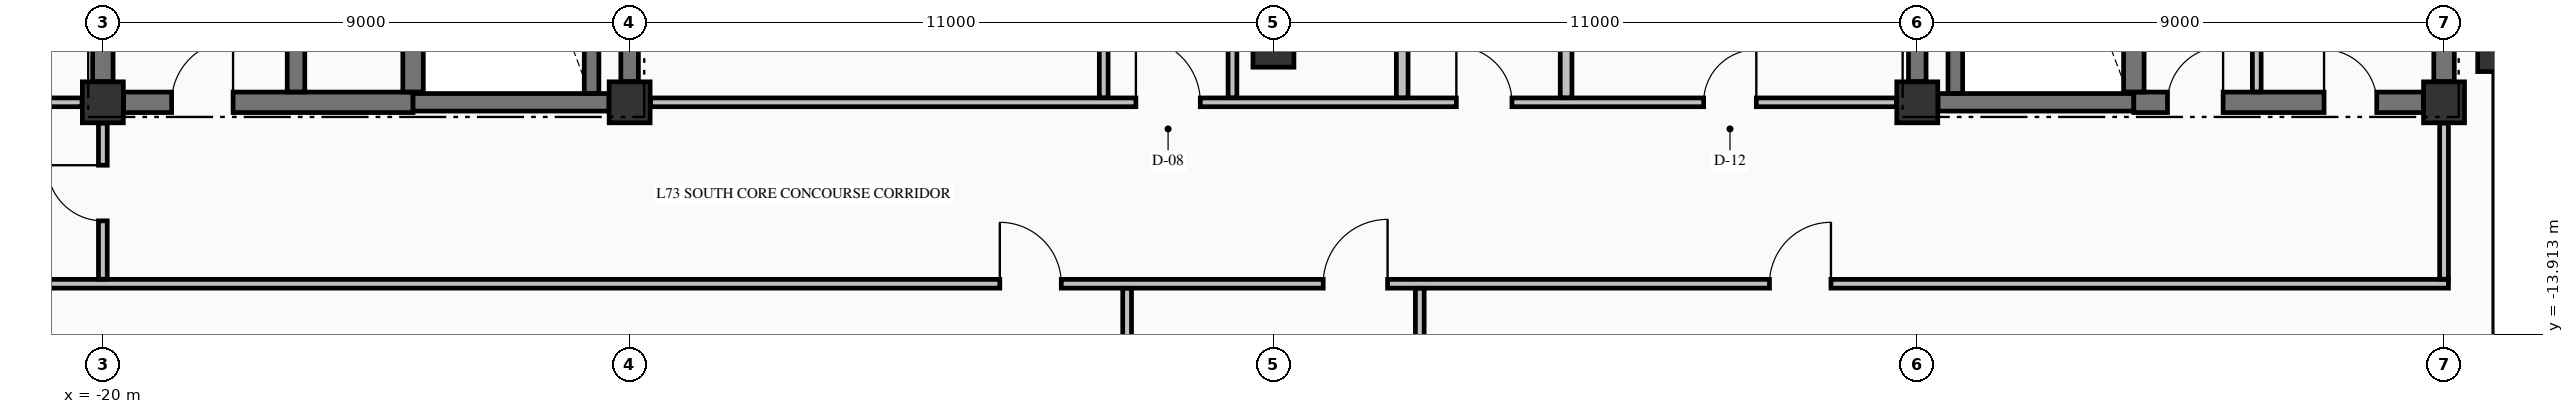
"""IFC4 building model, lengths in metres.
Left out: names, types, materials, properties, quantities, classifications, styles, units other than length and angle.
Written with IfcOpenShell. Run it as: python <this file> out.ifc"""

import sys

from ifc_helpers import new_model, si_unit, direction, frame, frame_2d, origin, origin_2d, place, context, subcontext, project, spatial, rectangle, extrude, element, fill, save


model = new_model("IFC4")
c1 = context("Model", 3, precision=1e-05, world=origin(), true_north=direction((0.0, 1.0)))
c2 = subcontext(c1, "Body", "Model", "MODEL_VIEW")
j1 = project(units=[si_unit("LENGTHUNIT", "METRE"), si_unit("PLANEANGLEUNIT", "RADIAN")], contexts=[c1])
p1 = place(None, origin())
s1 = spatial("IfcSite", under=j1, at=p1, CompositionType="ELEMENT")
p2 = place(p1, origin())
s2 = spatial("IfcBuilding", under=s1, at=p2, CompositionType="ELEMENT")
p3 = place(p2, frame((0.0, 0.0, 274.32)))
s3 = spatial("IfcBuildingStorey", under=s2, at=p3, CompositionType="ELEMENT", Elevation=274.32)
p4 = place(p3, frame((21.0, -9.0, -0.25), z_axis=(0.0, 0.0, 1.0), x_axis=(1.0, 0.0, 0.0)))
e1 = element("IfcColumn", 1, at=p4, inside=s3, PredefinedType="COLUMN", context=c2, shape_type="SweptSolid", body=[
    extrude(rectangle(XDim=0.85, YDim=0.85, at=origin_2d()), origin(), (0.0, 0.0, 1.0), 3.565),
])
for number, where, z_axis, x_axis in (
    (2, (-20.0, -9.95, -0.25), (0.0, 0.0, 1.0), (1.0, 0.0, 0.0)),
    (3, (-11.0, -9.95, -0.25), (0.0, 0.0, 1.0), (1.0, 0.0, 0.0)),
    (4, (11.0, -9.95, -0.25), (0.0, 0.0, 1.0), (1.0, 0.0, 0.0)),
    (5, (20.0, -9.95, -0.25), (0.0, 0.0, 1.0), (1.0, 0.0, 0.0)),
    (6, (0.0, -9.0, -0.25), (0.0, 0.0, 1.0), (1.0, 0.0, 0.0)),
):
    element("IfcColumn", number, at=place(p3, frame(where, z_axis=z_axis, x_axis=x_axis)), inside=s3, PredefinedType="COLUMN", context=c2, shape_type="SweptSolid", body=[
        extrude(rectangle(XDim=0.7, YDim=0.7, at=origin_2d()), origin(), (0.0, 0.0, 1.0), 3.565),
    ])
p5 = place(p3, frame((21.0, -17.545, 0.0), z_axis=(0.0, 0.0, 1.0), x_axis=(0.0, 1.0, 0.0)))
e7 = element("IfcWall", 7, at=p5, inside=s3, PredefinedType="STANDARD", context=c2, shape_type="SweptSolid", body=[
    extrude(rectangle(XDim=8.09, YDim=0.3, at=frame_2d((4.045, 0.0))), origin(), (0.0, 0.0, 1.0), 2.707),
])
p6 = place(p3, frame((-19.646, -9.95, 0.0), z_axis=(0.0, 0.0, 1.0), x_axis=(1.0, 0.0, 0.0)))
e8 = element("IfcWall", 8, at=p6, inside=s3, PredefinedType="SHEAR", context=c2, shape_type="SweptSolid", body=[
    extrude(rectangle(XDim=4.946, YDim=0.35, at=frame_2d((2.473, 0.0))), origin(), (0.0, 0.0, 1.0), 3.315),
])
p7 = place(p6, frame((0.821, 0.0, 0.0)))
e9 = element("IfcOpeningElement", 9, at=p7, cuts=e8, PredefinedType="OPENING", context=c2, shape_type="SweptSolid", body=[
    extrude(rectangle(XDim=1.05, YDim=2.15, at=frame_2d((0.525, 1.075))), frame((0.0, 0.185, 0.0), z_axis=(0.0, -1.0, 0.0), x_axis=(1.0, 0.0, 0.0)), (0.0, 0.0, 1.0), 0.37),
])
for number, where, z_axis, x_axis in (
    (10, (-14.7, -9.95, 0.0), (0.0, 0.0, 1.0), (1.0, 0.0, 0.0)),
    (11, (11.354, -9.95, 0.0), (0.0, 0.0, 1.0), (1.0, 0.0, 0.0)),
):
    element("IfcWall", number, at=place(p3, frame(where, z_axis=z_axis, x_axis=x_axis)), inside=s3, PredefinedType="SHEAR", context=c2, shape_type="SweptSolid", body=[
        extrude(rectangle(XDim=3.346, YDim=0.3, at=frame_2d((1.673, 0.0))), origin(), (0.0, 0.0, 1.0), 3.315),
    ])
p8 = place(p3, frame((14.7, -9.95, 0.0), z_axis=(0.0, 0.0, 1.0), x_axis=(1.0, 0.0, 0.0)))
e12 = element("IfcWall", 12, at=p8, inside=s3, PredefinedType="SHEAR", context=c2, shape_type="SweptSolid", body=[
    extrude(rectangle(XDim=4.946, YDim=0.35, at=frame_2d((2.473, 0.0))), origin(), (0.0, 0.0, 1.0), 3.315),
])
p9 = place(p8, frame((3.25, 0.0, 0.0)))
e13 = element("IfcOpeningElement", 13, at=p9, cuts=e12, PredefinedType="OPENING", context=c2, shape_type="SweptSolid", body=[
    extrude(rectangle(XDim=0.9, YDim=2.15, at=frame_2d((0.45, 1.075))), frame((0.0, 0.185, 0.0), z_axis=(0.0, -1.0, 0.0), x_axis=(1.0, 0.0, 0.0)), (0.0, 0.0, 1.0), 0.37),
])
p10 = place(p8, frame((0.575, 0.0, 0.0)))
e14 = element("IfcOpeningElement", 14, at=p10, cuts=e12, PredefinedType="OPENING", context=c2, shape_type="SweptSolid", body=[
    extrude(rectangle(XDim=0.95, YDim=2.15, at=frame_2d((0.475, 1.075))), frame((0.0, 0.185, 0.0), z_axis=(0.0, -1.0, 0.0), x_axis=(1.0, 0.0, 0.0)), (0.0, 0.0, 1.0), 0.37),
])
p11 = place(p3, frame((-25.835, -13.05, 0.0), z_axis=(0.0, 0.0, 1.0), x_axis=(1.0, 0.0, 0.0)))
e15 = element("IfcWall", 15, at=p11, inside=s3, PredefinedType="PARTITIONING", context=c2, shape_type="SweptSolid", body=[
    extrude(rectangle(XDim=45.91, YDim=0.15, at=frame_2d((22.955, 0.0))), origin(), (0.0, 0.0, 1.0), 3.315),
])
p12 = place(p11, frame((26.685, 0.0, 0.0)))
e16 = element("IfcOpeningElement", 16, at=p12, cuts=e15, PredefinedType="OPENING", context=c2, shape_type="SweptSolid", body=[
    extrude(rectangle(XDim=1.1, YDim=2.15, at=frame_2d((0.55, 1.075))), frame((0.0, 0.085, 0.0), z_axis=(0.0, -1.0, 0.0), x_axis=(1.0, 0.0, 0.0)), (0.0, 0.0, 1.0), 0.17),
])
p13 = place(p11, frame((21.16, 0.0, 0.0)))
e17 = element("IfcOpeningElement", 17, at=p13, cuts=e15, PredefinedType="OPENING", context=c2, shape_type="SweptSolid", body=[
    extrude(rectangle(XDim=1.05, YDim=2.15, at=frame_2d((0.525, 1.075))), frame((0.0, 0.085, 0.0), z_axis=(0.0, -1.0, 0.0), x_axis=(1.0, 0.0, 0.0)), (0.0, 0.0, 1.0), 0.17),
])
p14 = place(p11, frame((34.31, 0.0, 0.0)))
e18 = element("IfcOpeningElement", 18, at=p14, cuts=e15, PredefinedType="OPENING", context=c2, shape_type="SweptSolid", body=[
    extrude(rectangle(XDim=1.05, YDim=2.15, at=frame_2d((0.525, 1.075))), frame((0.0, 0.085, 0.0), z_axis=(0.0, -1.0, 0.0), x_axis=(1.0, 0.0, 0.0)), (0.0, 0.0, 1.0), 0.17),
])
p15 = place(p3, frame((-25.835, -9.95, 0.0), z_axis=(0.0, 0.0, 1.0), x_axis=(1.0, 0.0, 0.0)))
e19 = element("IfcWall", 19, at=p15, inside=s3, PredefinedType="PARTITIONING", context=c2, shape_type="SweptSolid", body=[
    extrude(rectangle(XDim=5.479, YDim=0.15, at=frame_2d((2.74, 0.0))), origin(), (0.0, 0.0, 1.0), 3.315),
])
p16 = place(p15, frame((2.335, 0.0, 0.0)))
e20 = element("IfcOpeningElement", 20, at=p16, cuts=e19, PredefinedType="OPENING", context=c2, shape_type="SweptSolid", body=[
    extrude(rectangle(XDim=1.0, YDim=2.15, at=frame_2d((0.5, 1.075))), frame((0.0, 0.085, 0.0), z_axis=(0.0, -1.0, 0.0), x_axis=(1.0, 0.0, 0.0)), (0.0, 0.0, 1.0), 0.17),
])
p17 = place(p3, frame((-10.644, -9.95, 0.0), z_axis=(0.0, 0.0, 1.0), x_axis=(1.0, 0.0, 0.0)))
e21 = element("IfcWall", 21, at=p17, inside=s3, PredefinedType="PARTITIONING", context=c2, shape_type="SweptSolid", body=[
    extrude(rectangle(XDim=21.288, YDim=0.15, at=frame_2d((10.644, 0.0))), origin(), (0.0, 0.0, 1.0), 3.315),
])
p18 = place(p17, frame((8.294, 0.0, 0.0)))
e22 = element("IfcOpeningElement", 22, at=p18, cuts=e21, PredefinedType="OPENING", context=c2, shape_type="SweptSolid", body=[
    extrude(rectangle(XDim=1.1, YDim=2.15, at=frame_2d((0.55, 1.075))), frame((0.0, 0.085, 0.0), z_axis=(0.0, -1.0, 0.0), x_axis=(1.0, 0.0, 0.0)), (0.0, 0.0, 1.0), 0.17),
])
p19 = place(p17, frame((13.769, 0.0, 0.0)))
e23 = element("IfcOpeningElement", 23, at=p19, cuts=e21, PredefinedType="OPENING", context=c2, shape_type="SweptSolid", body=[
    extrude(rectangle(XDim=0.95, YDim=2.15, at=frame_2d((0.475, 1.075))), frame((0.0, 0.085, 0.0), z_axis=(0.0, -1.0, 0.0), x_axis=(1.0, 0.0, 0.0)), (0.0, 0.0, 1.0), 0.17),
])
p20 = place(p17, frame((17.994, 0.0, 0.0)))
e24 = element("IfcOpeningElement", 24, at=p20, cuts=e21, PredefinedType="OPENING", context=c2, shape_type="SweptSolid", body=[
    extrude(rectangle(XDim=0.9, YDim=2.15, at=frame_2d((0.45, 1.075))), frame((0.0, 0.085, 0.0), z_axis=(0.0, -1.0, 0.0), x_axis=(1.0, 0.0, 0.0)), (0.0, 0.0, 1.0), 0.17),
])
p21 = place(p3, frame((-20.0, -9.596, 0.0), z_axis=(0.0, 0.0, 1.0), x_axis=(0.0, 1.0, 0.0)))
e25 = element("IfcWall", 25, at=p21, inside=s3, PredefinedType="SHEAR", context=c2, shape_type="SweptSolid", body=[
    extrude(rectangle(XDim=9.242, YDim=0.35, at=frame_2d((4.621, 0.0))), origin(), (0.0, 0.0, 1.0), 3.315),
])
p22 = place(p3, frame((-16.7, -9.773, 0.0), z_axis=(0.0, 0.0, 1.0), x_axis=(0.0, 1.0, 0.0)))
e26 = element("IfcWall", 26, at=p22, inside=s3, PredefinedType="SHEAR", context=c2, shape_type="SweptSolid", body=[
    extrude(rectangle(XDim=9.371, YDim=0.3, at=frame_2d((4.686, 0.0))), origin(), (0.0, 0.0, 1.0), 3.315),
])
p23 = place(p3, frame((-14.7, -9.773, 0.0), z_axis=(0.0, 0.0, 1.0), x_axis=(0.0, 1.0, 0.0)))
e27 = element("IfcWall", 27, at=p23, inside=s3, PredefinedType="SHEAR", context=c2, shape_type="SweptSolid", body=[
    extrude(rectangle(XDim=9.371, YDim=0.35, at=frame_2d((4.686, 0.0))), origin(), (0.0, 0.0, 1.0), 3.315),
])
p24 = place(p3, frame((-11.65, -9.798, 0.0), z_axis=(0.0, 0.0, 1.0), x_axis=(0.0, 1.0, 0.0)))
e28 = element("IfcWall", 28, at=p24, inside=s3, PredefinedType="SOLIDWALL", context=c2, shape_type="SweptSolid", body=[
    extrude(rectangle(XDim=9.396, YDim=0.25, at=frame_2d((4.698, 0.0))), origin(), (0.0, 0.0, 1.0), 3.315),
])
for number, where, z_axis, x_axis in (
    (29, (-11.0, -9.596, 0.0), (0.0, 0.0, 1.0), (0.0, 1.0, 0.0)),
    (30, (11.0, -9.596, 0.0), (0.0, 0.0, 1.0), (0.0, 1.0, 0.0)),
):
    element("IfcWall", number, at=place(p3, frame(where, z_axis=z_axis, x_axis=x_axis)), inside=s3, PredefinedType="SHEAR", context=c2, shape_type="SweptSolid", body=[
        extrude(rectangle(XDim=9.242, YDim=0.3, at=frame_2d((4.621, 0.0))), origin(), (0.0, 0.0, 1.0), 3.315),
    ])
p25 = place(p3, frame((11.65, -9.798, 0.0), z_axis=(0.0, 0.0, 1.0), x_axis=(0.0, 1.0, 0.0)))
e31 = element("IfcWall", 31, at=p25, inside=s3, PredefinedType="SOLIDWALL", context=c2, shape_type="SweptSolid", body=[
    extrude(rectangle(XDim=9.396, YDim=0.25, at=frame_2d((4.698, 0.0))), origin(), (0.0, 0.0, 1.0), 3.315),
])
p26 = place(p3, frame((14.7, -9.773, 0.0), z_axis=(0.0, 0.0, 1.0), x_axis=(0.0, 1.0, 0.0)))
e32 = element("IfcWall", 32, at=p26, inside=s3, PredefinedType="SHEAR", context=c2, shape_type="SweptSolid", body=[
    extrude(rectangle(XDim=9.371, YDim=0.35, at=frame_2d((4.686, 0.0))), origin(), (0.0, 0.0, 1.0), 3.315),
])
p27 = place(p3, frame((20.0, -9.596, 0.0), z_axis=(0.0, 0.0, 1.0), x_axis=(0.0, 1.0, 0.0)))
e33 = element("IfcWall", 33, at=p27, inside=s3, PredefinedType="SHEAR", context=c2, shape_type="SweptSolid", body=[
    extrude(rectangle(XDim=14.769, YDim=0.35, at=frame_2d((7.385, 0.0))), origin(), (0.0, 0.0, 1.0), 3.315),
])
p28 = place(p3, frame((-20.0, -12.972, 0.0), z_axis=(0.0, 0.0, 1.0), x_axis=(0.0, 1.0, 0.0)))
e34 = element("IfcWall", 34, at=p28, inside=s3, PredefinedType="PARTITIONING", context=c2, shape_type="SweptSolid", body=[
    extrude(rectangle(XDim=2.666, YDim=0.15, at=frame_2d((1.333, 0.0))), origin(), (0.0, 0.0, 1.0), 3.315),
])
p29 = place(p28, frame((0.997, 0.0, 0.0)))
e35 = element("IfcOpeningElement", 35, at=p29, cuts=e34, PredefinedType="OPENING", context=c2, shape_type="SweptSolid", body=[
    extrude(rectangle(XDim=0.95, YDim=2.15, at=frame_2d((0.475, 1.075))), frame((0.0, 0.085, 0.0), z_axis=(0.0, -1.0, 0.0), x_axis=(1.0, 0.0, 0.0)), (0.0, 0.0, 1.0), 0.17),
])
p30 = place(p3, frame((-2.9, -9.872, 0.0), z_axis=(0.0, 0.0, 1.0), x_axis=(0.0, 1.0, 0.0)))
e36 = element("IfcWall", 36, at=p30, inside=s3, PredefinedType="PARTITIONING", context=c2, shape_type="SweptSolid", body=[
    extrude(rectangle(XDim=9.544, YDim=0.15, at=frame_2d((4.772, 0.0))), origin(), (0.0, 0.0, 1.0), 3.315),
])
p31 = place(p3, frame((-2.5, -18.272, 0.0), z_axis=(0.0, 0.0, 1.0), x_axis=(0.0, 1.0, 0.0)))
e37 = element("IfcWall", 37, at=p31, inside=s3, PredefinedType="PARTITIONING", context=c2, shape_type="SweptSolid", body=[
    extrude(rectangle(XDim=5.144, YDim=0.15, at=frame_2d((2.572, 0.0))), origin(), (0.0, 0.0, 1.0), 3.315),
])
p32 = place(p3, frame((-0.7, -9.872, 0.0), z_axis=(0.0, 0.0, 1.0), x_axis=(0.0, 1.0, 0.0)))
e38 = element("IfcWall", 38, at=p32, inside=s3, PredefinedType="PARTITIONING", context=c2, shape_type="SweptSolid", body=[
    extrude(rectangle(XDim=5.519, YDim=0.15, at=frame_2d((2.76, 0.0))), origin(), (0.0, 0.0, 1.0), 3.315),
])
p33 = place(p32, frame((2.597, 0.0, 0.0)))
e39 = element("IfcOpeningElement", 39, at=p33, cuts=e38, PredefinedType="OPENING", context=c2, shape_type="SweptSolid", body=[
    extrude(rectangle(XDim=0.95, YDim=2.15, at=frame_2d((0.475, 1.075))), frame((0.0, 0.085, 0.0), z_axis=(0.0, -1.0, 0.0), x_axis=(1.0, 0.0, 0.0)), (0.0, 0.0, 1.0), 0.17),
])
p34 = place(p3, frame((2.2, -9.872, 0.0), z_axis=(0.0, 0.0, 1.0), x_axis=(0.0, 1.0, 0.0)))
e40 = element("IfcWall", 40, at=p34, inside=s3, PredefinedType="PARTITIONING", context=c2, shape_type="SweptSolid", body=[
    extrude(rectangle(XDim=5.519, YDim=0.2, at=frame_2d((2.76, 0.0))), origin(), (0.0, 0.0, 1.0), 3.315),
])
p35 = place(p3, frame((2.5, -18.272, 0.0), z_axis=(0.0, 0.0, 1.0), x_axis=(0.0, 1.0, 0.0)))
e41 = element("IfcWall", 41, at=p35, inside=s3, PredefinedType="PARTITIONING", context=c2, shape_type="SweptSolid", body=[
    extrude(rectangle(XDim=5.144, YDim=0.15, at=frame_2d((2.572, 0.0))), origin(), (0.0, 0.0, 1.0), 3.315),
])
p36 = place(p3, frame((5.0, -9.872, 0.0), z_axis=(0.0, 0.0, 1.0), x_axis=(0.0, 1.0, 0.0)))
e42 = element("IfcWall", 42, at=p36, inside=s3, PredefinedType="PARTITIONING", context=c2, shape_type="SweptSolid", body=[
    extrude(rectangle(XDim=5.519, YDim=0.2, at=frame_2d((2.76, 0.0))), origin(), (0.0, 0.0, 1.0), 3.315),
])
p37 = place(p3, frame((16.8, -9.772, 0.0), z_axis=(0.0, 0.0, 1.0), x_axis=(0.0, 1.0, 0.0)))
e43 = element("IfcWall", 43, at=p37, inside=s3, PredefinedType="PARTITIONING", context=c2, shape_type="SweptSolid", body=[
    extrude(rectangle(XDim=7.194, YDim=0.15, at=frame_2d((3.597, 0.0))), origin(), (0.0, 0.0, 1.0), 3.315),
])
p38 = place(p3, frame((20.0, -12.972, 0.0), z_axis=(0.0, 0.0, 1.0), x_axis=(0.0, 1.0, 0.0)))
e44 = element("IfcWall", 44, at=p38, inside=s3, PredefinedType="PARTITIONING", context=c2, shape_type="SweptSolid", body=[
    extrude(rectangle(XDim=2.666, YDim=0.15, at=frame_2d((1.333, 0.0))), origin(), (0.0, 0.0, 1.0), 2.905),
])
p39 = place(p7, origin())
e45 = element("IfcDoor", 45, at=p39, inside=s3, OperationType="SINGLE_SWING_RIGHT", PredefinedType="DOOR", context=c2, shape_type="SweptSolid", body=[
    extrude(rectangle(XDim=1.05, YDim=2.15, at=frame_2d((0.525, 1.075))), frame((0.0, 0.025, 0.0), z_axis=(0.0, -1.0, 0.0), x_axis=(1.0, 0.0, 0.0)), (0.0, 0.0, 1.0), 0.05),
])
fill(e9, e45)
p40 = place(p9, origin())
e46 = element("IfcDoor", 46, at=p40, inside=s3, OperationType="SINGLE_SWING_LEFT", PredefinedType="DOOR", context=c2, shape_type="SweptSolid", body=[
    extrude(rectangle(XDim=0.9, YDim=2.15, at=frame_2d((0.45, 1.075))), frame((0.0, 0.025, 0.0), z_axis=(0.0, -1.0, 0.0), x_axis=(1.0, 0.0, 0.0)), (0.0, 0.0, 1.0), 0.05),
])
fill(e13, e46)
p41 = place(p10, origin())
e47 = element("IfcDoor", 47, at=p41, inside=s3, OperationType="SINGLE_SWING_RIGHT", PredefinedType="DOOR", context=c2, shape_type="SweptSolid", body=[
    extrude(rectangle(XDim=0.95, YDim=2.15, at=frame_2d((0.475, 1.075))), frame((0.0, 0.025, 0.0), z_axis=(0.0, -1.0, 0.0), x_axis=(1.0, 0.0, 0.0)), (0.0, 0.0, 1.0), 0.05),
])
fill(e14, e47)
p42 = place(p18, origin())
e48 = element("IfcDoor", 48, at=p42, inside=s3, OperationType="SINGLE_SWING_LEFT", PredefinedType="DOOR", context=c2, shape_type="SweptSolid", body=[
    extrude(rectangle(XDim=1.1, YDim=2.15, at=frame_2d((0.55, 1.075))), frame((0.0, 0.025, 0.0), z_axis=(0.0, -1.0, 0.0), x_axis=(1.0, 0.0, 0.0)), (0.0, 0.0, 1.0), 0.05),
])
fill(e22, e48)
p43 = place(p12, origin())
e49 = element("IfcDoor", 49, at=p43, inside=s3, OperationType="SINGLE_SWING_RIGHT", PredefinedType="DOOR", context=c2, shape_type="SweptSolid", body=[
    extrude(rectangle(XDim=1.1, YDim=2.15, at=frame_2d((0.55, 1.075))), frame((0.0, 0.025, 0.0), z_axis=(0.0, -1.0, 0.0), x_axis=(1.0, 0.0, 0.0)), (0.0, 0.0, 1.0), 0.05),
])
fill(e16, e49)
p44 = place(p13, origin())
e50 = element("IfcDoor", 50, at=p44, inside=s3, OperationType="SINGLE_SWING_LEFT", PredefinedType="DOOR", context=c2, shape_type="SweptSolid", body=[
    extrude(rectangle(XDim=1.05, YDim=2.15, at=frame_2d((0.525, 1.075))), frame((0.0, 0.025, 0.0), z_axis=(0.0, -1.0, 0.0), x_axis=(1.0, 0.0, 0.0)), (0.0, 0.0, 1.0), 0.05),
])
fill(e17, e50)
p45 = place(p14, origin())
e51 = element("IfcDoor", 51, at=p45, inside=s3, OperationType="SINGLE_SWING_RIGHT", PredefinedType="DOOR", context=c2, shape_type="SweptSolid", body=[
    extrude(rectangle(XDim=1.05, YDim=2.15, at=frame_2d((0.525, 1.075))), frame((0.0, 0.025, 0.0), z_axis=(0.0, -1.0, 0.0), x_axis=(1.0, 0.0, 0.0)), (0.0, 0.0, 1.0), 0.05),
])
fill(e18, e51)
p46 = place(p19, origin())
e52 = element("IfcDoor", 52, at=p46, inside=s3, OperationType="SINGLE_SWING_LEFT", PredefinedType="DOOR", context=c2, shape_type="SweptSolid", body=[
    extrude(rectangle(XDim=0.95, YDim=2.15, at=frame_2d((0.475, 1.075))), frame((0.0, 0.025, 0.0), z_axis=(0.0, -1.0, 0.0), x_axis=(1.0, 0.0, 0.0)), (0.0, 0.0, 1.0), 0.05),
])
fill(e23, e52)
p47 = place(p20, origin())
e53 = element("IfcDoor", 53, at=p47, inside=s3, OperationType="SINGLE_SWING_RIGHT", PredefinedType="DOOR", context=c2, shape_type="SweptSolid", body=[
    extrude(rectangle(XDim=0.9, YDim=2.15, at=frame_2d((0.45, 1.075))), frame((0.0, 0.025, 0.0), z_axis=(0.0, -1.0, 0.0), x_axis=(1.0, 0.0, 0.0)), (0.0, 0.0, 1.0), 0.05),
])
fill(e24, e53)
p48 = place(p29, origin())
e54 = element("IfcDoor", 54, at=p48, inside=s3, OperationType="SINGLE_SWING_RIGHT", PredefinedType="DOOR", context=c2, shape_type="SweptSolid", body=[
    extrude(rectangle(XDim=0.95, YDim=2.15, at=frame_2d((0.475, 1.075))), frame((0.0, 0.025, 0.0), z_axis=(0.0, -1.0, 0.0), x_axis=(1.0, 0.0, 0.0)), (0.0, 0.0, 1.0), 0.05),
])
fill(e35, e54)
save(model, sys.argv[1])
